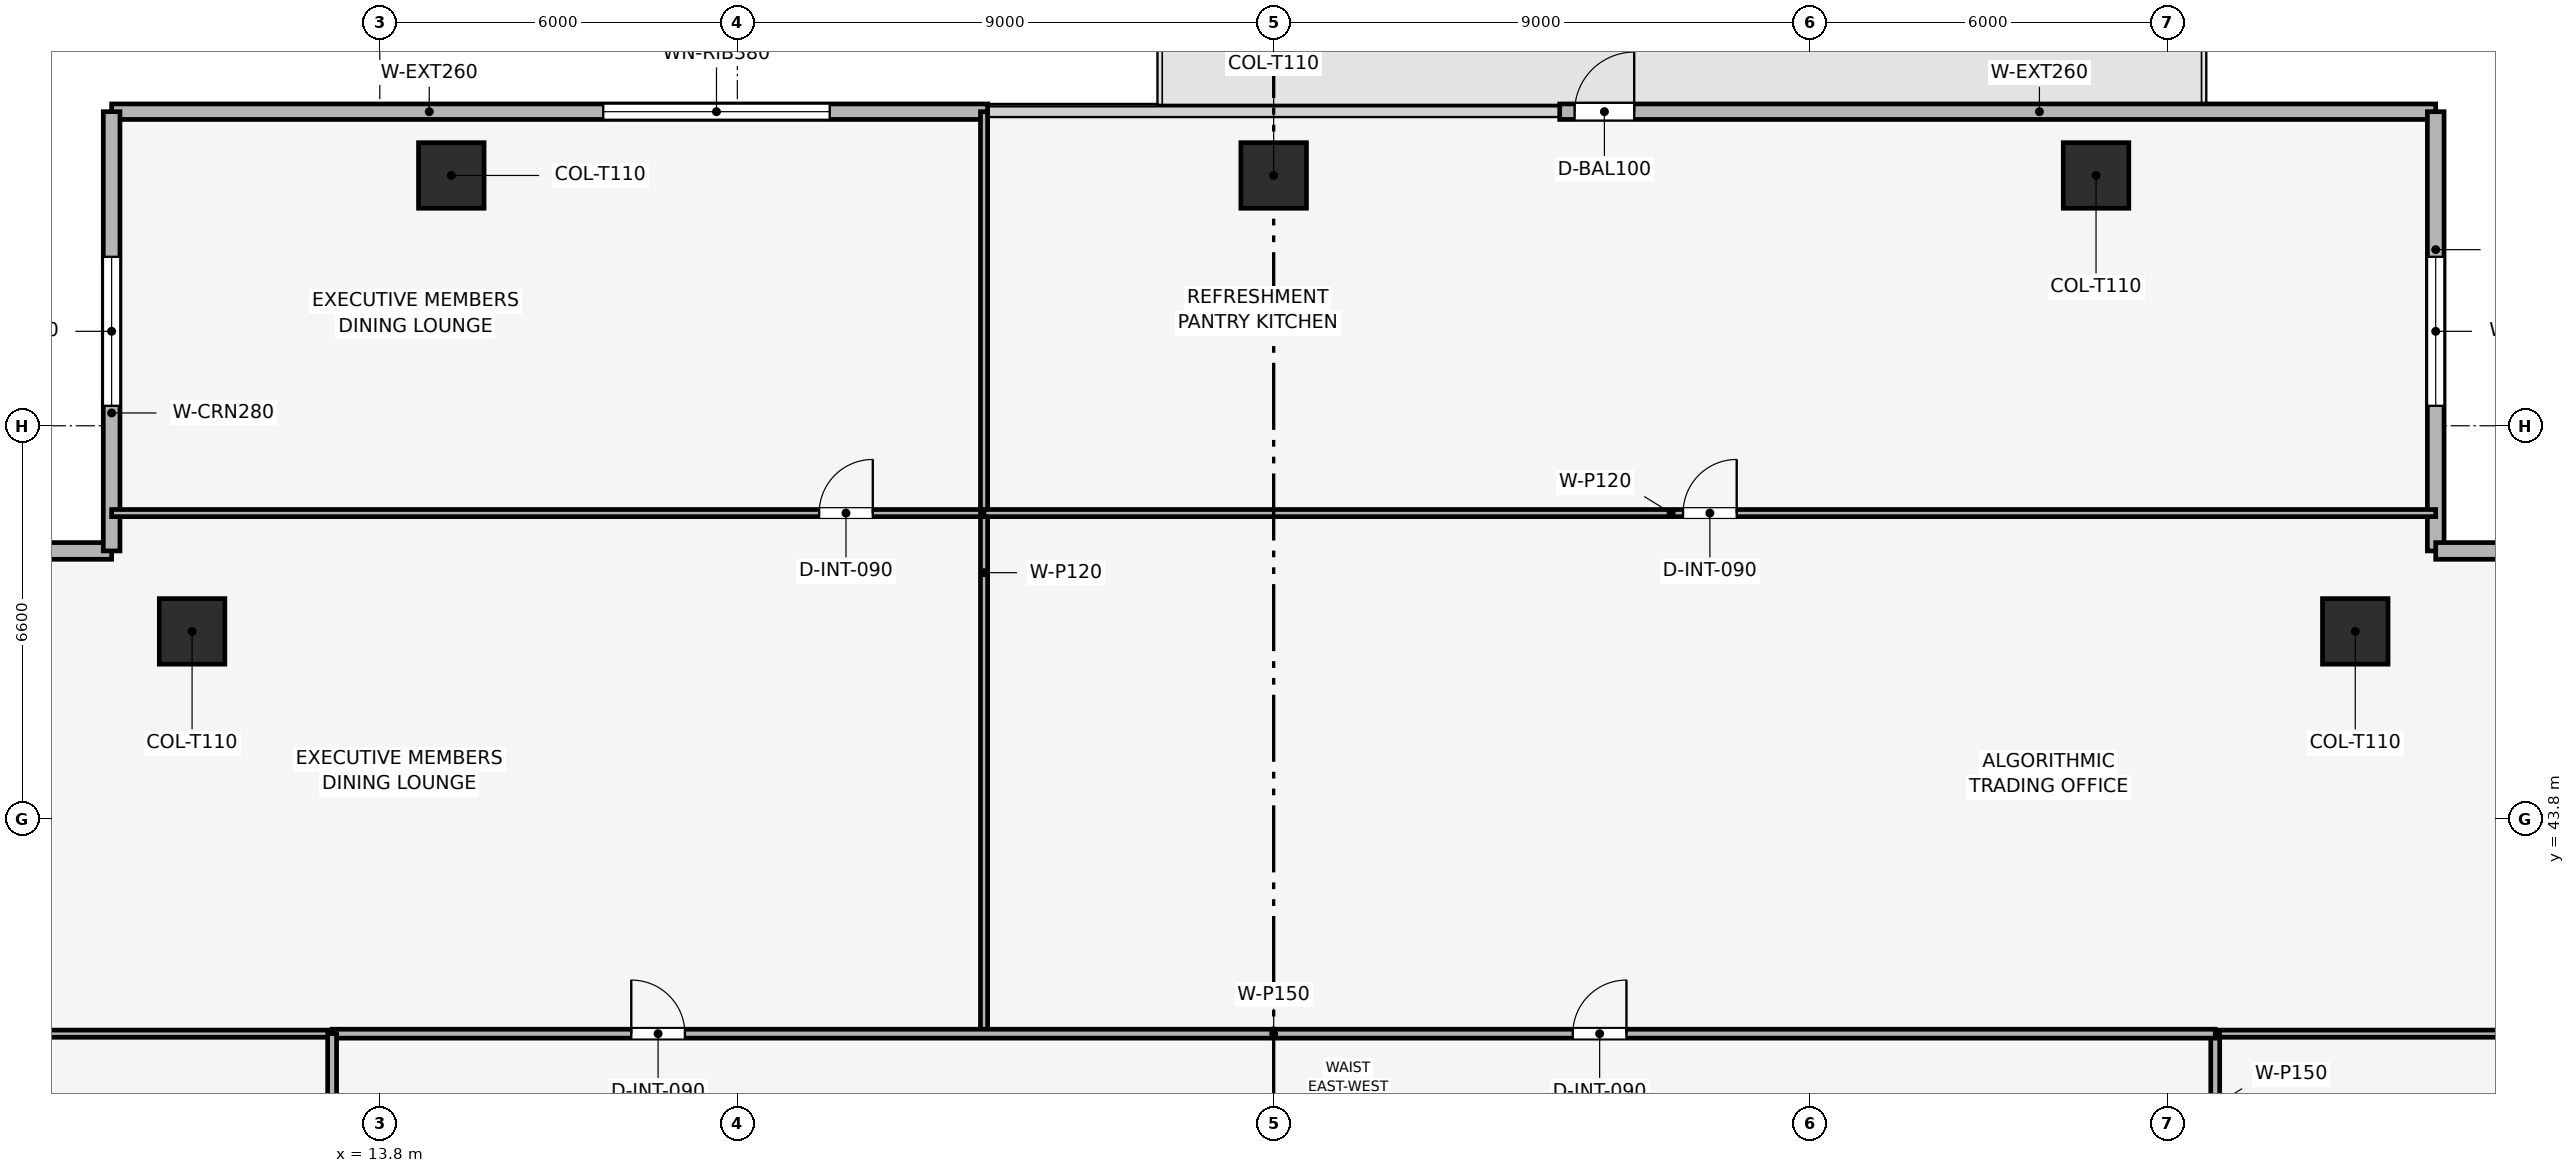
"""IFC4 building model, lengths in metres.
Left out: names, types, materials, properties, quantities, classifications, styles, units other than length and angle.
Written with IfcOpenShell. Run it as: python <this file> out.ifc"""

import sys

from ifc_helpers import new_model, si_unit, direction, frame, frame_2d, origin, origin_2d, place, context, subcontext, project, spatial, rectangle, extrude, element, fill, save


model = new_model("IFC4")
c1 = context("Model", 3, precision=1e-05, world=origin(), true_north=direction((0.0, 1.0)))
c2 = subcontext(c1, "Body", "Model", "MODEL_VIEW")
j1 = project(units=[si_unit("LENGTHUNIT", "METRE"), si_unit("PLANEANGLEUNIT", "RADIAN")], contexts=[c1])
p1 = place(None, origin())
s1 = spatial("IfcSite", under=j1, at=p1, CompositionType="ELEMENT")
p2 = place(p1, origin())
s2 = spatial("IfcBuilding", under=s1, at=p2, CompositionType="ELEMENT")
p3 = place(p2, frame((0.0, 0.0, 207.45)))
s3 = spatial("IfcBuildingStorey", under=s2, at=p3, CompositionType="ELEMENT", Elevation=207.45)
for number, where, z_axis, x_axis in (
    (1, (42.6, 54.6, 0.003), (0.0, 0.0, 1.0), (1.0, 0.0, 0.0)),
    (2, (28.8, 54.6, 0.003), (0.0, 0.0, 1.0), (1.0, 0.0, 0.0)),
    (3, (15.0, 54.6, 0.003), (0.0, 0.0, 1.0), (1.0, 0.0, 0.0)),
    (4, (46.95, 46.95, 0.003), (0.0, 0.0, 1.0), (1.0, 0.0, 0.0)),
    (5, (10.65, 46.95, 0.003), (0.0, 0.0, 1.0), (1.0, 0.0, 0.0)),
):
    element("IfcColumn", number, at=place(p3, frame(where, z_axis=z_axis, x_axis=x_axis)), inside=s3, PredefinedType="COLUMN", context=c2, shape_type="SweptSolid", body=[
        extrude(rectangle(XDim=1.1, YDim=1.1, at=origin_2d()), origin(), (0.0, 0.0, 1.0), 3.494),
    ])
p4 = place(p3, frame((9.3, 55.67, 0.0), z_axis=(0.0, 0.0, 1.0), x_axis=(1.0, 0.0, 0.0)))
e6 = element("IfcWall", 6, at=p4, inside=s3, PredefinedType="SOLIDWALL", context=c2, shape_type="SweptSolid", body=[
    extrude(rectangle(XDim=14.7, YDim=0.26, at=frame_2d((7.35, 0.0))), origin(), (0.0, 0.0, 1.0), 3.5),
])
p5 = place(p4, frame((8.25, 0.0, 0.9)))
e7 = element("IfcOpeningElement", 7, at=p5, cuts=e6, PredefinedType="OPENING", context=c2, shape_type="SweptSolid", body=[
    extrude(rectangle(XDim=3.8, YDim=1.9, at=frame_2d((1.9, 0.95))), frame((0.0, 0.14, 0.0), z_axis=(0.0, -1.0, 0.0), x_axis=(1.0, 0.0, 0.0)), (0.0, 0.0, 1.0), 0.28),
])
p6 = place(p3, frame((33.6, 55.67, 0.0), z_axis=(0.0, 0.0, 1.0), x_axis=(1.0, 0.0, 0.0)))
e8 = element("IfcWall", 8, at=p6, inside=s3, PredefinedType="SOLIDWALL", context=c2, shape_type="SweptSolid", body=[
    extrude(rectangle(XDim=14.7, YDim=0.26, at=frame_2d((7.35, 0.0))), origin(), (0.0, 0.0, 1.0), 3.5),
])
p7 = place(p6, frame((0.25, 0.0, 0.0)))
e9 = element("IfcOpeningElement", 9, at=p7, cuts=e8, PredefinedType="OPENING", context=c2, shape_type="SweptSolid", body=[
    extrude(rectangle(XDim=1.0, YDim=2.2, at=frame_2d((0.5, 1.1))), frame((0.0, 0.14, 0.0), z_axis=(0.0, -1.0, 0.0), x_axis=(1.0, 0.0, 0.0)), (0.0, 0.0, 1.0), 0.28),
])
p8 = place(p3, frame((1.93, 48.3, 0.0), z_axis=(0.0, 0.0, 1.0), x_axis=(1.0, 0.0, 0.0)))
e10 = element("IfcWall", 10, at=p8, inside=s3, PredefinedType="SOLIDWALL", context=c2, shape_type="SweptSolid", body=[
    extrude(rectangle(XDim=7.37, YDim=0.28, at=frame_2d((3.685, 0.0))), origin(), (0.0, 0.0, 1.0), 3.5),
])
p9 = place(p8, frame((2.435, 0.0, 0.9)))
e11 = element("IfcOpeningElement", 11, at=p9, cuts=e10, PredefinedType="OPENING", context=c2, shape_type="SweptSolid", body=[
    extrude(rectangle(XDim=2.5, YDim=1.9, at=frame_2d((1.25, 0.95))), frame((0.0, 0.15, 0.0), z_axis=(0.0, -1.0, 0.0), x_axis=(1.0, 0.0, 0.0)), (0.0, 0.0, 1.0), 0.3),
])
p10 = place(p3, frame((9.3, 48.3, 0.0), z_axis=(0.0, 0.0, 1.0), x_axis=(0.0, 1.0, 0.0)))
e12 = element("IfcWall", 12, at=p10, inside=s3, PredefinedType="SOLIDWALL", context=c2, shape_type="SweptSolid", body=[
    extrude(rectangle(XDim=7.37, YDim=0.28, at=frame_2d((3.685, 0.0))), origin(), (0.0, 0.0, 1.0), 3.5),
])
p11 = place(p10, frame((2.435, 0.0, 0.9)))
e13 = element("IfcOpeningElement", 13, at=p11, cuts=e12, PredefinedType="OPENING", context=c2, shape_type="SweptSolid", body=[
    extrude(rectangle(XDim=2.5, YDim=1.9, at=frame_2d((1.25, 0.95))), frame((0.0, 0.15, 0.0), z_axis=(0.0, -1.0, 0.0), x_axis=(1.0, 0.0, 0.0)), (0.0, 0.0, 1.0), 0.3),
])
p12 = place(p3, frame((48.3, 55.67, 0.0), z_axis=(0.0, 0.0, 1.0), x_axis=(0.0, -1.0, 0.0)))
e14 = element("IfcWall", 14, at=p12, inside=s3, PredefinedType="SOLIDWALL", context=c2, shape_type="SweptSolid", body=[
    extrude(rectangle(XDim=7.37, YDim=0.28, at=frame_2d((3.685, 0.0))), origin(), (0.0, 0.0, 1.0), 3.5),
])
p13 = place(p12, frame((2.435, 0.0, 0.9)))
e15 = element("IfcOpeningElement", 15, at=p13, cuts=e14, PredefinedType="OPENING", context=c2, shape_type="SweptSolid", body=[
    extrude(rectangle(XDim=2.5, YDim=1.9, at=frame_2d((1.25, 0.95))), frame((0.0, 0.15, 0.0), z_axis=(0.0, -1.0, 0.0), x_axis=(1.0, 0.0, 0.0)), (0.0, 0.0, 1.0), 0.3),
])
p14 = place(p3, frame((48.3, 48.3, 0.0), z_axis=(0.0, 0.0, 1.0), x_axis=(1.0, 0.0, 0.0)))
e16 = element("IfcWall", 16, at=p14, inside=s3, PredefinedType="SOLIDWALL", context=c2, shape_type="SweptSolid", body=[
    extrude(rectangle(XDim=7.37, YDim=0.28, at=frame_2d((3.685, 0.0))), origin(), (0.0, 0.0, 1.0), 3.5),
])
p15 = place(p14, frame((2.435, 0.0, 0.9)))
e17 = element("IfcOpeningElement", 17, at=p15, cuts=e16, PredefinedType="OPENING", context=c2, shape_type="SweptSolid", body=[
    extrude(rectangle(XDim=2.5, YDim=1.9, at=frame_2d((1.25, 0.95))), frame((0.0, 0.15, 0.0), z_axis=(0.0, -1.0, 0.0), x_axis=(1.0, 0.0, 0.0)), (0.0, 0.0, 1.0), 0.3),
])
p16 = place(p3, frame((9.3, 48.935, 0.0), z_axis=(0.0, 0.0, 1.0), x_axis=(1.0, 0.0, 0.0)))
e18 = element("IfcWall", 18, at=p16, inside=s3, PredefinedType="PARTITIONING", context=c2, shape_type="SweptSolid", body=[
    extrude(rectangle(XDim=14.64, YDim=0.12, at=frame_2d((7.32, 0.0))), origin(), (0.0, 0.0, 1.0), 2.885),
])
p17 = place(p16, frame((11.873, 0.0, 0.0)))
e19 = element("IfcOpeningElement", 19, at=p17, cuts=e18, PredefinedType="OPENING", context=c2, shape_type="SweptSolid", body=[
    extrude(rectangle(XDim=0.9, YDim=2.1, at=frame_2d((0.45, 1.05))), frame((0.0, 0.07, 0.0), z_axis=(0.0, -1.0, 0.0), x_axis=(1.0, 0.0, 0.0)), (0.0, 0.0, 1.0), 0.14),
])
p18 = place(p3, frame((23.94, 40.2, 0.0), z_axis=(0.0, 0.0, 1.0), x_axis=(0.0, 1.0, 0.0)))
e20 = element("IfcWall", 20, at=p18, inside=s3, PredefinedType="PARTITIONING", context=c2, shape_type="SweptSolid", body=[
    extrude(rectangle(XDim=15.47, YDim=0.12, at=frame_2d((7.735, 0.0))), origin(), (0.0, 0.0, 1.0), 2.885),
])
p19 = place(p3, frame((23.94, 48.935, 0.0), z_axis=(0.0, 0.0, 1.0), x_axis=(1.0, 0.0, 0.0)))
e21 = element("IfcWall", 21, at=p19, inside=s3, PredefinedType="PARTITIONING", context=c2, shape_type="SweptSolid", body=[
    extrude(rectangle(XDim=24.36, YDim=0.12, at=frame_2d((12.18, 0.0))), origin(), (0.0, 0.0, 1.0), 2.885),
])
p20 = place(p19, frame((11.73, 0.0, 0.0)))
e22 = element("IfcOpeningElement", 22, at=p20, cuts=e21, PredefinedType="OPENING", context=c2, shape_type="SweptSolid", body=[
    extrude(rectangle(XDim=0.9, YDim=2.1, at=frame_2d((0.45, 1.05))), frame((0.0, 0.07, 0.0), z_axis=(0.0, -1.0, 0.0), x_axis=(1.0, 0.0, 0.0)), (0.0, 0.0, 1.0), 0.14),
])
p21 = place(p3, frame((1.93, 40.2, 0.0), z_axis=(0.0, 0.0, 1.0), x_axis=(1.0, 0.0, 0.0)))
e23 = element("IfcWall", 23, at=p21, inside=s3, PredefinedType="PARTITIONING", context=c2, shape_type="SweptSolid", body=[
    extrude(rectangle(XDim=11.07, YDim=0.12, at=frame_2d((5.535, 0.0))), origin(), (0.0, 0.0, 1.0), 2.885),
])
p22 = place(p3, frame((44.6, 40.2, 0.0), z_axis=(0.0, 0.0, 1.0), x_axis=(1.0, 0.0, 0.0)))
e24 = element("IfcWall", 24, at=p22, inside=s3, PredefinedType="PARTITIONING", context=c2, shape_type="SweptSolid", body=[
    extrude(rectangle(XDim=11.07, YDim=0.12, at=frame_2d((5.535, 0.0))), origin(), (0.0, 0.0, 1.0), 2.885),
])
p23 = place(p3, frame((44.6, 37.8, 0.0), z_axis=(0.0, 0.0, 1.0), x_axis=(0.0, 1.0, 0.0)))
e25 = element("IfcWall", 25, at=p23, inside=s3, PredefinedType="PARTITIONING", context=c2, shape_type="SweptSolid", body=[
    extrude(rectangle(XDim=2.4, YDim=0.15, at=frame_2d((1.2, 0.0))), origin(), (0.0, 0.0, 1.0), 3.5),
])
p24 = place(p3, frame((13.0, 40.2, 0.0), z_axis=(0.0, 0.0, 1.0), x_axis=(1.0, 0.0, 0.0)))
e26 = element("IfcWall", 26, at=p24, inside=s3, PredefinedType="PARTITIONING", context=c2, shape_type="SweptSolid", body=[
    extrude(rectangle(XDim=31.6, YDim=0.15, at=frame_2d((15.8, 0.0))), origin(), (0.0, 0.0, 1.0), 3.035),
])
p25 = place(p24, frame((5.02, 0.0, 0.0)))
e27 = element("IfcOpeningElement", 27, at=p25, cuts=e26, PredefinedType="OPENING", context=c2, shape_type="SweptSolid", body=[
    extrude(rectangle(XDim=0.9, YDim=2.1, at=frame_2d((0.45, 1.05))), frame((0.0, 0.085, 0.0), z_axis=(0.0, -1.0, 0.0), x_axis=(1.0, 0.0, 0.0)), (0.0, 0.0, 1.0), 0.17),
])
p26 = place(p24, frame((20.82, 0.0, 0.0)))
e28 = element("IfcOpeningElement", 28, at=p26, cuts=e26, PredefinedType="OPENING", context=c2, shape_type="SweptSolid", body=[
    extrude(rectangle(XDim=0.9, YDim=2.1, at=frame_2d((0.45, 1.05))), frame((0.0, 0.085, 0.0), z_axis=(0.0, -1.0, 0.0), x_axis=(1.0, 0.0, 0.0)), (0.0, 0.0, 1.0), 0.17),
])
p27 = place(p3, frame((13.0, 17.4, 0.0), z_axis=(0.0, 0.0, 1.0), x_axis=(0.0, 1.0, 0.0)))
e29 = element("IfcWall", 29, at=p27, inside=s3, PredefinedType="PARTITIONING", context=c2, shape_type="SweptSolid", body=[
    extrude(rectangle(XDim=22.8, YDim=0.15, at=frame_2d((11.4, 0.0))), origin(), (0.0, 0.0, 1.0), 3.035),
])
p28 = place(p27, frame((3.1, 0.0, 0.0)))
e30 = element("IfcOpeningElement", 30, at=p28, cuts=e29, PredefinedType="OPENING", context=c2, shape_type="SweptSolid", body=[
    extrude(rectangle(XDim=0.9, YDim=2.1, at=frame_2d((0.45, 1.05))), frame((0.0, 0.085, 0.0), z_axis=(0.0, -1.0, 0.0), x_axis=(1.0, 0.0, 0.0)), (0.0, 0.0, 1.0), 0.17),
])
p29 = place(p27, frame((7.685, 0.0, 0.0)))
e31 = element("IfcOpeningElement", 31, at=p29, cuts=e29, PredefinedType="OPENING", context=c2, shape_type="SweptSolid", body=[
    extrude(rectangle(XDim=0.9, YDim=2.1, at=frame_2d((0.45, 1.05))), frame((0.0, 0.085, 0.0), z_axis=(0.0, -1.0, 0.0), x_axis=(1.0, 0.0, 0.0)), (0.0, 0.0, 1.0), 0.17),
])
p30 = place(p27, frame((15.535, 0.0, 0.0)))
e32 = element("IfcOpeningElement", 32, at=p30, cuts=e29, PredefinedType="OPENING", context=c2, shape_type="SweptSolid", body=[
    extrude(rectangle(XDim=0.9, YDim=2.1, at=frame_2d((0.45, 1.05))), frame((0.0, 0.085, 0.0), z_axis=(0.0, -1.0, 0.0), x_axis=(1.0, 0.0, 0.0)), (0.0, 0.0, 1.0), 0.17),
])
p31 = place(p7, origin())
e33 = element("IfcDoor", 33, at=p31, inside=s3, OperationType="SINGLE_SWING_RIGHT", PredefinedType="DOOR", context=c2, shape_type="SweptSolid", body=[
    extrude(rectangle(XDim=1.0, YDim=2.2, at=frame_2d((0.5, 1.1))), frame((0.0, 0.025, 0.0), z_axis=(0.0, -1.0, 0.0), x_axis=(1.0, 0.0, 0.0)), (0.0, 0.0, 1.0), 0.05),
])
fill(e9, e33)
p32 = place(p5, origin())
e34 = element("IfcWindow", 34, at=p32, inside=s3, PartitioningType="SINGLE_PANEL", PredefinedType="WINDOW", context=c2, shape_type="SweptSolid", body=[
    extrude(rectangle(XDim=3.8, YDim=1.9, at=frame_2d((1.9, 0.95))), frame((0.0, 0.03, 0.0), z_axis=(0.0, -1.0, 0.0), x_axis=(1.0, 0.0, 0.0)), (0.0, 0.0, 1.0), 0.06),
])
fill(e7, e34)
p33 = place(p11, origin())
e35 = element("IfcWindow", 35, at=p33, inside=s3, PartitioningType="SINGLE_PANEL", PredefinedType="WINDOW", context=c2, shape_type="SweptSolid", body=[
    extrude(rectangle(XDim=2.5, YDim=1.9, at=frame_2d((1.25, 0.95))), frame((0.0, 0.03, 0.0), z_axis=(0.0, -1.0, 0.0), x_axis=(1.0, 0.0, 0.0)), (0.0, 0.0, 1.0), 0.06),
])
fill(e13, e35)
p34 = place(p13, origin())
e36 = element("IfcWindow", 36, at=p34, inside=s3, PartitioningType="SINGLE_PANEL", PredefinedType="WINDOW", context=c2, shape_type="SweptSolid", body=[
    extrude(rectangle(XDim=2.5, YDim=1.9, at=frame_2d((1.25, 0.95))), frame((0.0, 0.03, 0.0), z_axis=(0.0, -1.0, 0.0), x_axis=(1.0, 0.0, 0.0)), (0.0, 0.0, 1.0), 0.06),
])
fill(e15, e36)
p35 = place(p17, origin())
e37 = element("IfcDoor", 37, at=p35, inside=s3, OperationType="SINGLE_SWING_RIGHT", PredefinedType="DOOR", context=c2, shape_type="SweptSolid", body=[
    extrude(rectangle(XDim=0.9, YDim=2.1, at=frame_2d((0.45, 1.05))), frame((0.0, 0.025, 0.0), z_axis=(0.0, -1.0, 0.0), x_axis=(1.0, 0.0, 0.0)), (0.0, 0.0, 1.0), 0.05),
])
fill(e19, e37)
p36 = place(p20, origin())
e38 = element("IfcDoor", 38, at=p36, inside=s3, OperationType="SINGLE_SWING_RIGHT", PredefinedType="DOOR", context=c2, shape_type="SweptSolid", body=[
    extrude(rectangle(XDim=0.9, YDim=2.1, at=frame_2d((0.45, 1.05))), frame((0.0, 0.025, 0.0), z_axis=(0.0, -1.0, 0.0), x_axis=(1.0, 0.0, 0.0)), (0.0, 0.0, 1.0), 0.05),
])
fill(e22, e38)
p37 = place(p25, origin())
e39 = element("IfcDoor", 39, at=p37, inside=s3, OperationType="SINGLE_SWING_LEFT", PredefinedType="DOOR", context=c2, shape_type="SweptSolid", body=[
    extrude(rectangle(XDim=0.9, YDim=2.1, at=frame_2d((0.45, 1.05))), frame((0.0, 0.025, 0.0), z_axis=(0.0, -1.0, 0.0), x_axis=(1.0, 0.0, 0.0)), (0.0, 0.0, 1.0), 0.05),
])
fill(e27, e39)
p38 = place(p26, origin())
e40 = element("IfcDoor", 40, at=p38, inside=s3, OperationType="SINGLE_SWING_RIGHT", PredefinedType="DOOR", context=c2, shape_type="SweptSolid", body=[
    extrude(rectangle(XDim=0.9, YDim=2.1, at=frame_2d((0.45, 1.05))), frame((0.0, 0.025, 0.0), z_axis=(0.0, -1.0, 0.0), x_axis=(1.0, 0.0, 0.0)), (0.0, 0.0, 1.0), 0.05),
])
fill(e28, e40)
save(model, sys.argv[1])
